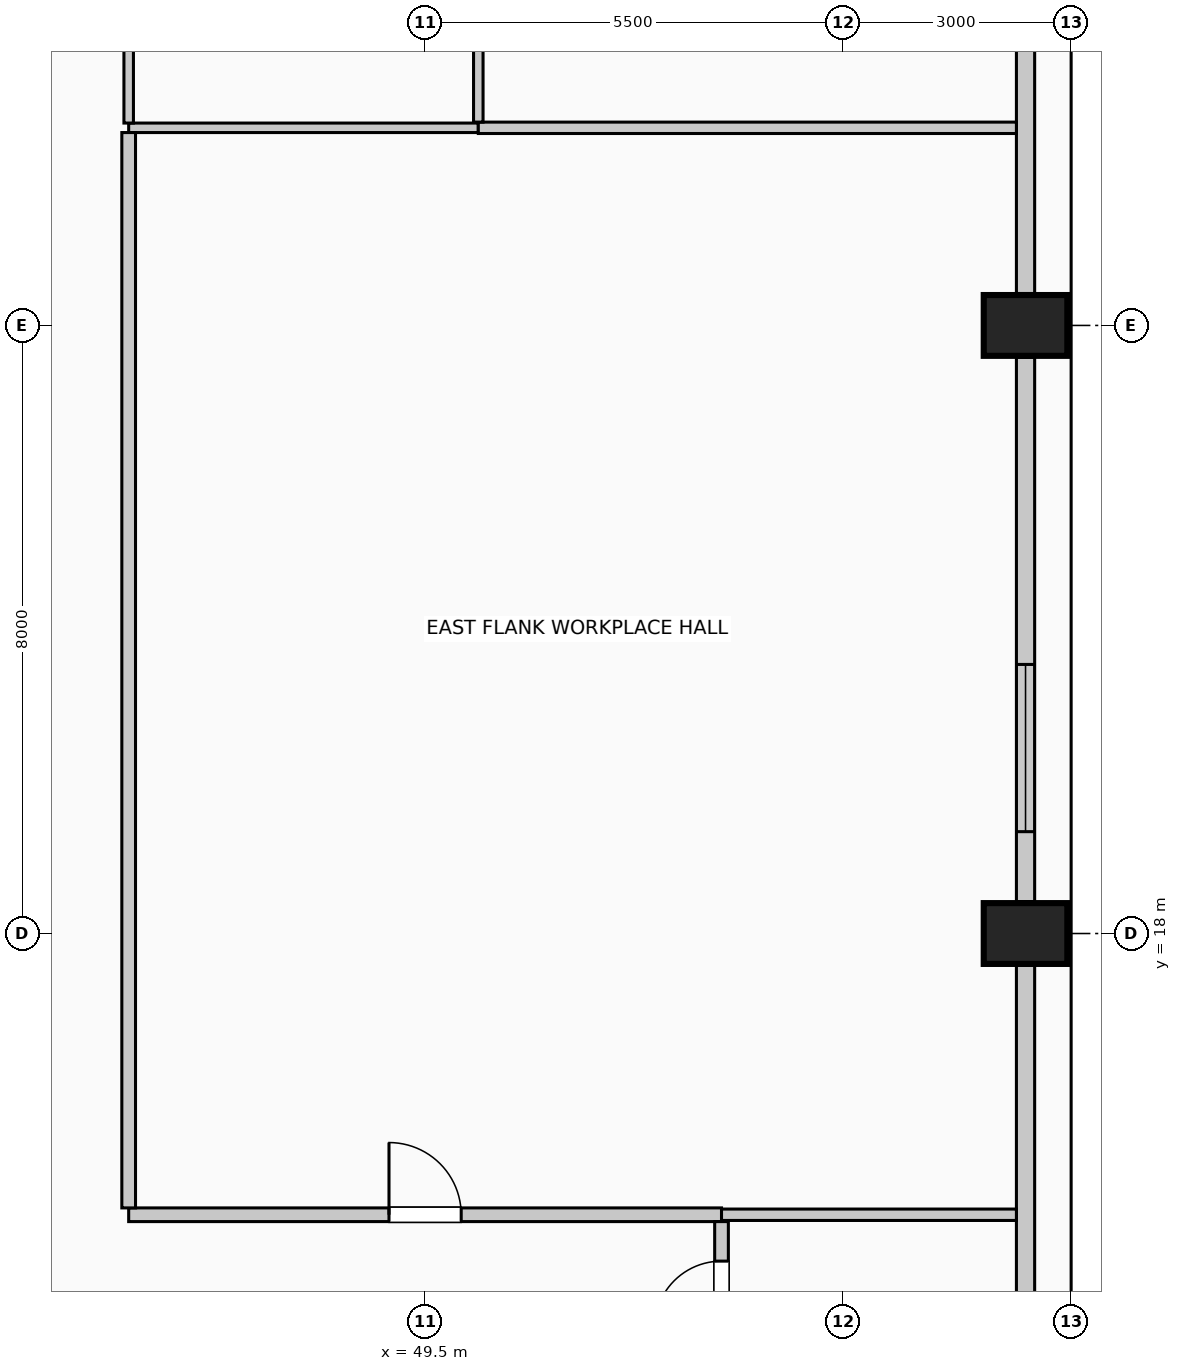
"""IFC4 building model, lengths in metres.
Left out: names, types, materials, properties, quantities, classifications, styles, units other than length and angle.
Written with IfcOpenShell. Run it as: python <this file> out.ifc"""

import sys

from ifc_helpers import new_model, si_unit, direction, frame, frame_2d, origin, origin_2d, place, context, subcontext, project, spatial, rectangle, extrude, element, fill, save


model = new_model("IFC4")
c1 = context("Model", 3, precision=1e-05, world=origin(), true_north=direction((0.0, 1.0)))
c2 = subcontext(c1, "Body", "Model", "MODEL_VIEW")
j1 = project(units=[si_unit("LENGTHUNIT", "METRE"), si_unit("PLANEANGLEUNIT", "RADIAN")], contexts=[c1])
p1 = place(None, origin())
s1 = spatial("IfcSite", under=j1, at=p1, CompositionType="ELEMENT")
p2 = place(p1, origin())
s2 = spatial("IfcBuilding", under=s1, at=p2, CompositionType="ELEMENT")
p3 = place(p2, frame((0.0, 0.0, 194.6)))
s3 = spatial("IfcBuildingStorey", under=s2, at=p3, CompositionType="ELEMENT", Elevation=194.6)
for number, where, z_axis, x_axis in (
    (1, (57.4, 18.0, 0.0), (0.0, 0.0, 1.0), (0.0, 1.0, 0.0)),
    (2, (57.4, 26.0, 0.0), (0.0, 0.0, 1.0), (0.0, 1.0, 0.0)),
):
    element("IfcColumn", number, at=place(p3, frame(where, z_axis=z_axis, x_axis=x_axis)), inside=s3, PredefinedType="COLUMN", context=c2, shape_type="SweptSolid", body=[
        extrude(rectangle(XDim=0.8, YDim=1.1, at=origin_2d()), origin(), (0.0, 0.0, 1.0), 4.0),
    ])
p4 = place(p3, frame((57.4, 17.58, 0.0), z_axis=(0.0, 0.0, 1.0), x_axis=(0.0, -1.0, 0.0)))
e3 = element("IfcWall", 3, at=p4, inside=s3, PredefinedType="SOLIDWALL", context=c2, shape_type="SweptSolid", body=[
    extrude(rectangle(XDim=7.16, YDim=0.24, at=frame_2d((3.58, 0.0))), origin(), (0.0, 0.0, 1.0), 3.0),
])
p5 = place(p3, frame((57.4, 25.58, 0.0), z_axis=(0.0, 0.0, 1.0), x_axis=(0.0, -1.0, 0.0)))
e4 = element("IfcWall", 4, at=p5, inside=s3, PredefinedType="SOLIDWALL", context=c2, shape_type="SweptSolid", body=[
    extrude(rectangle(XDim=7.16, YDim=0.24, at=frame_2d((3.58, 0.0))), origin(), (0.0, 0.0, 1.0), 3.0),
])
p6 = place(p5, frame((4.04, 0.0, 0.42)))
e5 = element("IfcOpeningElement", 5, at=p6, cuts=e4, PredefinedType="OPENING", context=c2, shape_type="SweptSolid", body=[
    extrude(rectangle(XDim=2.2, YDim=1.95, at=frame_2d((1.1, 0.975))), frame((0.0, 0.13, 0.0), z_axis=(0.0, -1.0, 0.0), x_axis=(1.0, 0.0, 0.0)), (0.0, 0.0, 1.0), 0.26),
])
p7 = place(p3, frame((57.4, 33.58, 0.0), z_axis=(0.0, 0.0, 1.0), x_axis=(0.0, -1.0, 0.0)))
e6 = element("IfcWall", 6, at=p7, inside=s3, PredefinedType="SOLIDWALL", context=c2, shape_type="SweptSolid", body=[
    extrude(rectangle(XDim=7.16, YDim=0.24, at=frame_2d((3.58, 0.0))), origin(), (0.0, 0.0, 1.0), 3.0),
])
p8 = place(p3, frame((45.6, 14.3, 0.0), z_axis=(0.0, 0.0, 1.0), x_axis=(1.0, 0.0, 0.0)))
e7 = element("IfcWall", 7, at=p8, inside=s3, PredefinedType="PARTITIONING", context=c2, shape_type="SweptSolid", body=[
    extrude(rectangle(XDim=7.8, YDim=0.18, at=frame_2d((3.9, 0.0))), origin(), (0.0, 0.0, 1.0), 3.75),
])
p9 = place(p8, frame((3.425, 0.0, 0.0)))
e8 = element("IfcOpeningElement", 8, at=p9, cuts=e7, PredefinedType="OPENING", context=c2, shape_type="SweptSolid", body=[
    extrude(rectangle(XDim=0.95, YDim=2.15, at=frame_2d((0.475, 1.075))), frame((0.0, 0.1, 0.0), z_axis=(0.0, -1.0, 0.0), x_axis=(1.0, 0.0, 0.0)), (0.0, 0.0, 1.0), 0.2),
])
p10 = place(p3, frame((53.4, 14.3, 0.0), z_axis=(0.0, 0.0, 1.0), x_axis=(1.0, 0.0, 0.0)))
e9 = element("IfcWall", 9, at=p10, inside=s3, PredefinedType="PARTITIONING", context=c2, shape_type="SweptSolid", body=[
    extrude(rectangle(XDim=3.88, YDim=0.15, at=frame_2d((1.94, 0.0))), origin(), (0.0, 0.0, 1.0), 3.75),
])
p11 = place(p3, frame((45.6, 28.6, 0.0), z_axis=(0.0, 0.0, 1.0), x_axis=(1.0, 0.0, 0.0)))
e10 = element("IfcWall", 10, at=p11, inside=s3, PredefinedType="PARTITIONING", context=c2, shape_type="SweptSolid", body=[
    extrude(rectangle(XDim=4.6, YDim=0.125, at=frame_2d((2.3, 0.0))), origin(), (0.0, 0.0, 1.0), 3.75),
])
p12 = place(p3, frame((50.2, 28.6, 0.0), z_axis=(0.0, 0.0, 1.0), x_axis=(1.0, 0.0, 0.0)))
e11 = element("IfcWall", 11, at=p12, inside=s3, PredefinedType="PARTITIONING", context=c2, shape_type="SweptSolid", body=[
    extrude(rectangle(XDim=7.08, YDim=0.15, at=frame_2d((3.54, 0.0))), origin(), (0.0, 0.0, 1.0), 3.75),
])
p13 = place(p3, frame((45.6, 14.39, 0.0), z_axis=(0.0, 0.0, 1.0), x_axis=(0.0, 1.0, 0.0)))
e12 = element("IfcWall", 12, at=p13, inside=s3, PredefinedType="PARTITIONING", context=c2, shape_type="SweptSolid", body=[
    extrude(rectangle(XDim=14.148, YDim=0.18, at=frame_2d((7.074, 0.0))), origin(), (0.0, 0.0, 1.0), 3.75),
])
p14 = place(p3, frame((45.6, 28.663, 0.0), z_axis=(0.0, 0.0, 1.0), x_axis=(0.0, 1.0, 0.0)))
e13 = element("IfcWall", 13, at=p14, inside=s3, PredefinedType="PARTITIONING", context=c2, shape_type="SweptSolid", body=[
    extrude(rectangle(XDim=3.625, YDim=0.125, at=frame_2d((1.812, 0.0))), origin(), (0.0, 0.0, 1.0), 3.75),
])
p15 = place(p3, frame((50.2, 28.675, 0.0), z_axis=(0.0, 0.0, 1.0), x_axis=(0.0, 1.0, 0.0)))
e14 = element("IfcWall", 14, at=p15, inside=s3, PredefinedType="PARTITIONING", context=c2, shape_type="SweptSolid", body=[
    extrude(rectangle(XDim=3.6, YDim=0.125, at=frame_2d((1.8, 0.0))), origin(), (0.0, 0.0, 1.0), 3.75),
])
p16 = place(p3, frame((53.4, 12.29, 0.0), z_axis=(0.0, 0.0, 1.0), x_axis=(0.0, 1.0, 0.0)))
e15 = element("IfcWall", 15, at=p16, inside=s3, PredefinedType="PARTITIONING", context=c2, shape_type="SweptSolid", body=[
    extrude(rectangle(XDim=1.92, YDim=0.18, at=frame_2d((0.96, 0.0))), origin(), (0.0, 0.0, 1.0), 3.75),
])
p17 = place(p16, frame((0.52, 0.0, 0.0)))
e16 = element("IfcOpeningElement", 16, at=p17, cuts=e15, PredefinedType="OPENING", context=c2, shape_type="SweptSolid", body=[
    extrude(rectangle(XDim=0.88, YDim=2.1, at=frame_2d((0.44, 1.05))), frame((0.0, 0.1, 0.0), z_axis=(0.0, -1.0, 0.0), x_axis=(1.0, 0.0, 0.0)), (0.0, 0.0, 1.0), 0.2),
])
p18 = place(p6, origin())
e17 = element("IfcWindow", 17, at=p18, inside=s3, PartitioningType="SINGLE_PANEL", PredefinedType="WINDOW", context=c2, shape_type="SweptSolid", body=[
    extrude(rectangle(XDim=2.2, YDim=1.95, at=frame_2d((1.1, 0.975))), frame((0.0, 0.03, 0.0), z_axis=(0.0, -1.0, 0.0), x_axis=(1.0, 0.0, 0.0)), (0.0, 0.0, 1.0), 0.06),
])
fill(e5, e17)
p19 = place(p9, origin())
e18 = element("IfcDoor", 18, at=p19, inside=s3, OperationType="SINGLE_SWING_LEFT", PredefinedType="DOOR", context=c2, shape_type="SweptSolid", body=[
    extrude(rectangle(XDim=0.95, YDim=2.15, at=frame_2d((0.475, 1.075))), frame((0.0, 0.025, 0.0), z_axis=(0.0, -1.0, 0.0), x_axis=(1.0, 0.0, 0.0)), (0.0, 0.0, 1.0), 0.05),
])
fill(e8, e18)
p20 = place(p17, origin())
e19 = element("IfcDoor", 19, at=p20, inside=s3, OperationType="SINGLE_SWING_LEFT", PredefinedType="DOOR", context=c2, shape_type="SweptSolid", body=[
    extrude(rectangle(XDim=0.88, YDim=2.1, at=frame_2d((0.44, 1.05))), frame((0.0, 0.025, 0.0), z_axis=(0.0, -1.0, 0.0), x_axis=(1.0, 0.0, 0.0)), (0.0, 0.0, 1.0), 0.05),
])
fill(e16, e19)
save(model, sys.argv[1])
